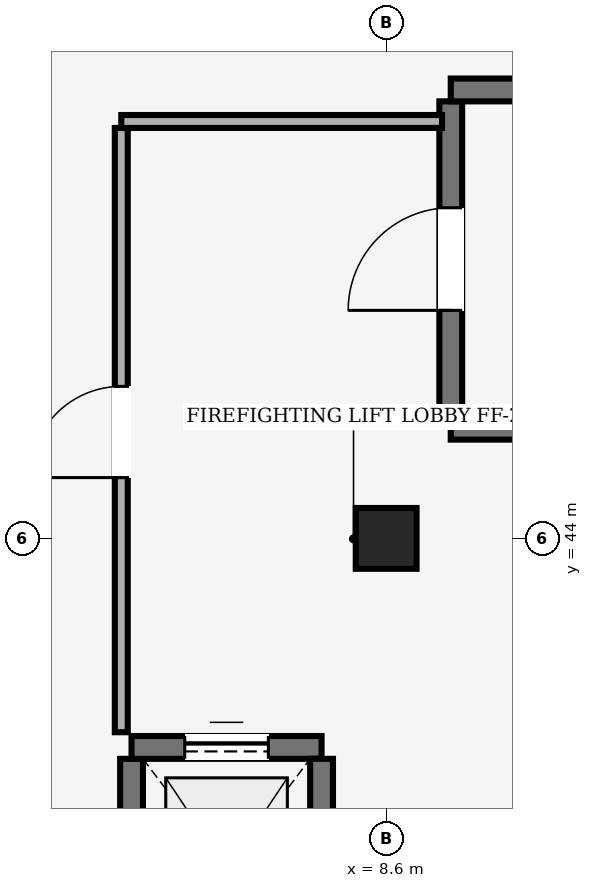
"""IFC4 building model, lengths in metres.
Left out: names, types, materials, properties, quantities, classifications, styles, units other than length and angle.
Written with IfcOpenShell. Run it as: python <this file> out.ifc"""

import sys

from ifc_helpers import new_model, si_unit, direction, frame, frame_2d, origin, origin_2d, place, context, subcontext, project, spatial, rectangle, extrude, element, fill, save


model = new_model("IFC4")
c1 = context("Model", 3, precision=1e-05, world=origin(), true_north=direction((0.0, 1.0)))
c2 = subcontext(c1, "Body", "Model", "MODEL_VIEW")
j1 = project(units=[si_unit("LENGTHUNIT", "METRE"), si_unit("PLANEANGLEUNIT", "RADIAN")], contexts=[c1])
p1 = place(None, origin())
s1 = spatial("IfcSite", under=j1, at=p1, CompositionType="ELEMENT")
p2 = place(p1, origin())
s2 = spatial("IfcBuilding", under=s1, at=p2, CompositionType="ELEMENT")
p3 = place(p2, origin())
s3 = spatial("IfcBuildingStorey", under=s2, at=p3, CompositionType="ELEMENT", Elevation=0.0)
p4 = place(p3, frame((8.6, 44.0, 0.0), z_axis=(0.0, 0.0, 1.0), x_axis=(1.0, 0.0, 0.0)))
e1 = element("IfcColumn", 1, at=p4, inside=s3, PredefinedType="COLUMN", context=c2, shape_type="SweptSolid", body=[
    extrude(rectangle(XDim=0.8, YDim=0.8, at=origin_2d()), origin(), (0.0, 0.0, 1.0), 4.25),
])
p5 = place(p3, frame((19.63, 45.45, 0.0), z_axis=(0.0, 0.0, 1.0), x_axis=(-1.0, 0.0, 0.0)))
e2 = element("IfcWall", 2, at=p5, inside=s3, PredefinedType="SHEAR", context=c2, shape_type="SweptSolid", body=[
    extrude(rectangle(XDim=10.18, YDim=0.3, at=frame_2d((5.09, 0.0))), origin(), (0.0, 0.0, 1.0), 4.25),
])
p6 = place(p3, frame((9.45, 45.6, 0.0), z_axis=(0.0, 0.0, 1.0), x_axis=(0.0, 1.0, 0.0)))
e3 = element("IfcWall", 3, at=p6, inside=s3, PredefinedType="SHEAR", context=c2, shape_type="SweptSolid", body=[
    extrude(rectangle(XDim=4.15, YDim=0.3, at=frame_2d((2.075, 0.0))), origin(), (0.0, 0.0, 1.0), 4.25),
])
p7 = place(p6, frame((1.4, 0.0, 0.0)))
e4 = element("IfcOpeningElement", 4, at=p7, cuts=e3, PredefinedType="OPENING", context=c2, shape_type="SweptSolid", body=[
    extrude(rectangle(XDim=1.35, YDim=2.2, at=frame_2d((0.675, 1.1))), frame((0.0, 0.15, 0.0), z_axis=(0.0, -1.0, 0.0), x_axis=(1.0, 0.0, 0.0)), (0.0, 0.0, 1.0), 0.3),
])
p8 = place(p3, frame((9.45, 49.9, 0.0), z_axis=(0.0, 0.0, 1.0), x_axis=(1.0, 0.0, 0.0)))
e5 = element("IfcWall", 5, at=p8, inside=s3, PredefinedType="SHEAR", context=c2, shape_type="SweptSolid", body=[
    extrude(rectangle(XDim=10.18, YDim=0.3, at=frame_2d((5.09, 0.0))), origin(), (0.0, 0.0, 1.0), 4.25),
])
p9 = place(p3, frame((5.25, 38.2, 0.0), z_axis=(0.0, 0.0, 1.0), x_axis=(0.0, 1.0, 0.0)))
e6 = element("IfcWall", 6, at=p9, inside=s3, PredefinedType="SHEAR", context=c2, shape_type="SweptSolid", body=[
    extrude(rectangle(XDim=2.9, YDim=0.3, at=frame_2d((1.45, 0.0))), origin(), (0.0, 0.0, 1.0), 4.25),
])
p10 = place(p3, frame((5.25, 41.25, 0.0), z_axis=(0.0, 0.0, 1.0), x_axis=(1.0, 0.0, 0.0)))
e7 = element("IfcWall", 7, at=p10, inside=s3, PredefinedType="SHEAR", context=c2, shape_type="SweptSolid", body=[
    extrude(rectangle(XDim=2.5, YDim=0.3, at=frame_2d((1.25, 0.0))), origin(), (0.0, 0.0, 1.0), 4.25),
])
p11 = place(p10, frame((0.7, 0.0, 0.0)))
e8 = element("IfcOpeningElement", 8, at=p11, cuts=e7, PredefinedType="OPENING", context=c2, shape_type="SweptSolid", body=[
    extrude(rectangle(XDim=1.1, YDim=2.1, at=frame_2d((0.55, 1.05))), frame((0.0, 0.15, 0.0), z_axis=(0.0, -1.0, 0.0), x_axis=(1.0, 0.0, 0.0)), (0.0, 0.0, 1.0), 0.3),
])
p12 = place(p3, frame((7.75, 41.1, 0.0), z_axis=(0.0, 0.0, 1.0), x_axis=(0.0, -1.0, 0.0)))
e9 = element("IfcWall", 9, at=p12, inside=s3, PredefinedType="SHEAR", context=c2, shape_type="SweptSolid", body=[
    extrude(rectangle(XDim=2.9, YDim=0.3, at=frame_2d((1.45, 0.0))), origin(), (0.0, 0.0, 1.0), 4.25),
])
p13 = place(p3, frame((5.115, 41.45, 0.0), z_axis=(0.0, 0.0, 1.0), x_axis=(0.0, 1.0, 0.0)))
e10 = element("IfcWall", 10, at=p13, inside=s3, PredefinedType="PARTITIONING", context=c2, shape_type="SweptSolid", body=[
    extrude(rectangle(XDim=7.95, YDim=0.17, at=frame_2d((3.975, 0.0))), origin(), (0.0, 0.0, 1.0), 4.23),
])
p14 = place(p13, frame((3.35, 0.0, 0.0)))
e11 = element("IfcOpeningElement", 11, at=p14, cuts=e10, PredefinedType="OPENING", context=c2, shape_type="SweptSolid", body=[
    extrude(rectangle(XDim=1.2, YDim=2.15, at=frame_2d((0.6, 1.075))), frame((0.0, 0.085, 0.0), z_axis=(0.0, -1.0, 0.0), x_axis=(1.0, 0.0, 0.0)), (0.0, 0.0, 1.0), 0.17),
])
p15 = place(p3, frame((5.115, 49.485, 0.0), z_axis=(0.0, 0.0, 1.0), x_axis=(1.0, 0.0, 0.0)))
e12 = element("IfcWall", 12, at=p15, inside=s3, PredefinedType="PARTITIONING", context=c2, shape_type="SweptSolid", body=[
    extrude(rectangle(XDim=4.22, YDim=0.17, at=frame_2d((2.11, 0.0))), origin(), (0.0, 0.0, 1.0), 4.23),
])
p16 = place(p7, origin())
e13 = element("IfcDoor", 13, at=p16, inside=s3, OperationType="SINGLE_SWING_LEFT", PredefinedType="DOOR", context=c2, shape_type="SweptSolid", body=[
    extrude(rectangle(XDim=1.35, YDim=2.2, at=frame_2d((0.675, 1.1))), frame((0.0, 0.025, 0.0), z_axis=(0.0, -1.0, 0.0), x_axis=(1.0, 0.0, 0.0)), (0.0, 0.0, 1.0), 0.05),
])
fill(e4, e13)
p17 = place(p11, origin())
e14 = element("IfcDoor", 14, at=p17, inside=s3, OperationType="SLIDING_TO_LEFT", PredefinedType="DOOR", context=c2, shape_type="SweptSolid", body=[
    extrude(rectangle(XDim=1.1, YDim=2.1, at=frame_2d((0.55, 1.05))), frame((0.0, 0.025, 0.0), z_axis=(0.0, -1.0, 0.0), x_axis=(1.0, 0.0, 0.0)), (0.0, 0.0, 1.0), 0.05),
])
fill(e8, e14)
p18 = place(p14, origin())
e15 = element("IfcDoor", 15, at=p18, inside=s3, OperationType="SINGLE_SWING_LEFT", PredefinedType="DOOR", context=c2, shape_type="SweptSolid", body=[
    extrude(rectangle(XDim=1.2, YDim=2.15, at=frame_2d((0.6, 1.075))), frame((0.0, 0.025, 0.0), z_axis=(0.0, -1.0, 0.0), x_axis=(1.0, 0.0, 0.0)), (0.0, 0.0, 1.0), 0.05),
])
fill(e11, e15)
save(model, sys.argv[1])
